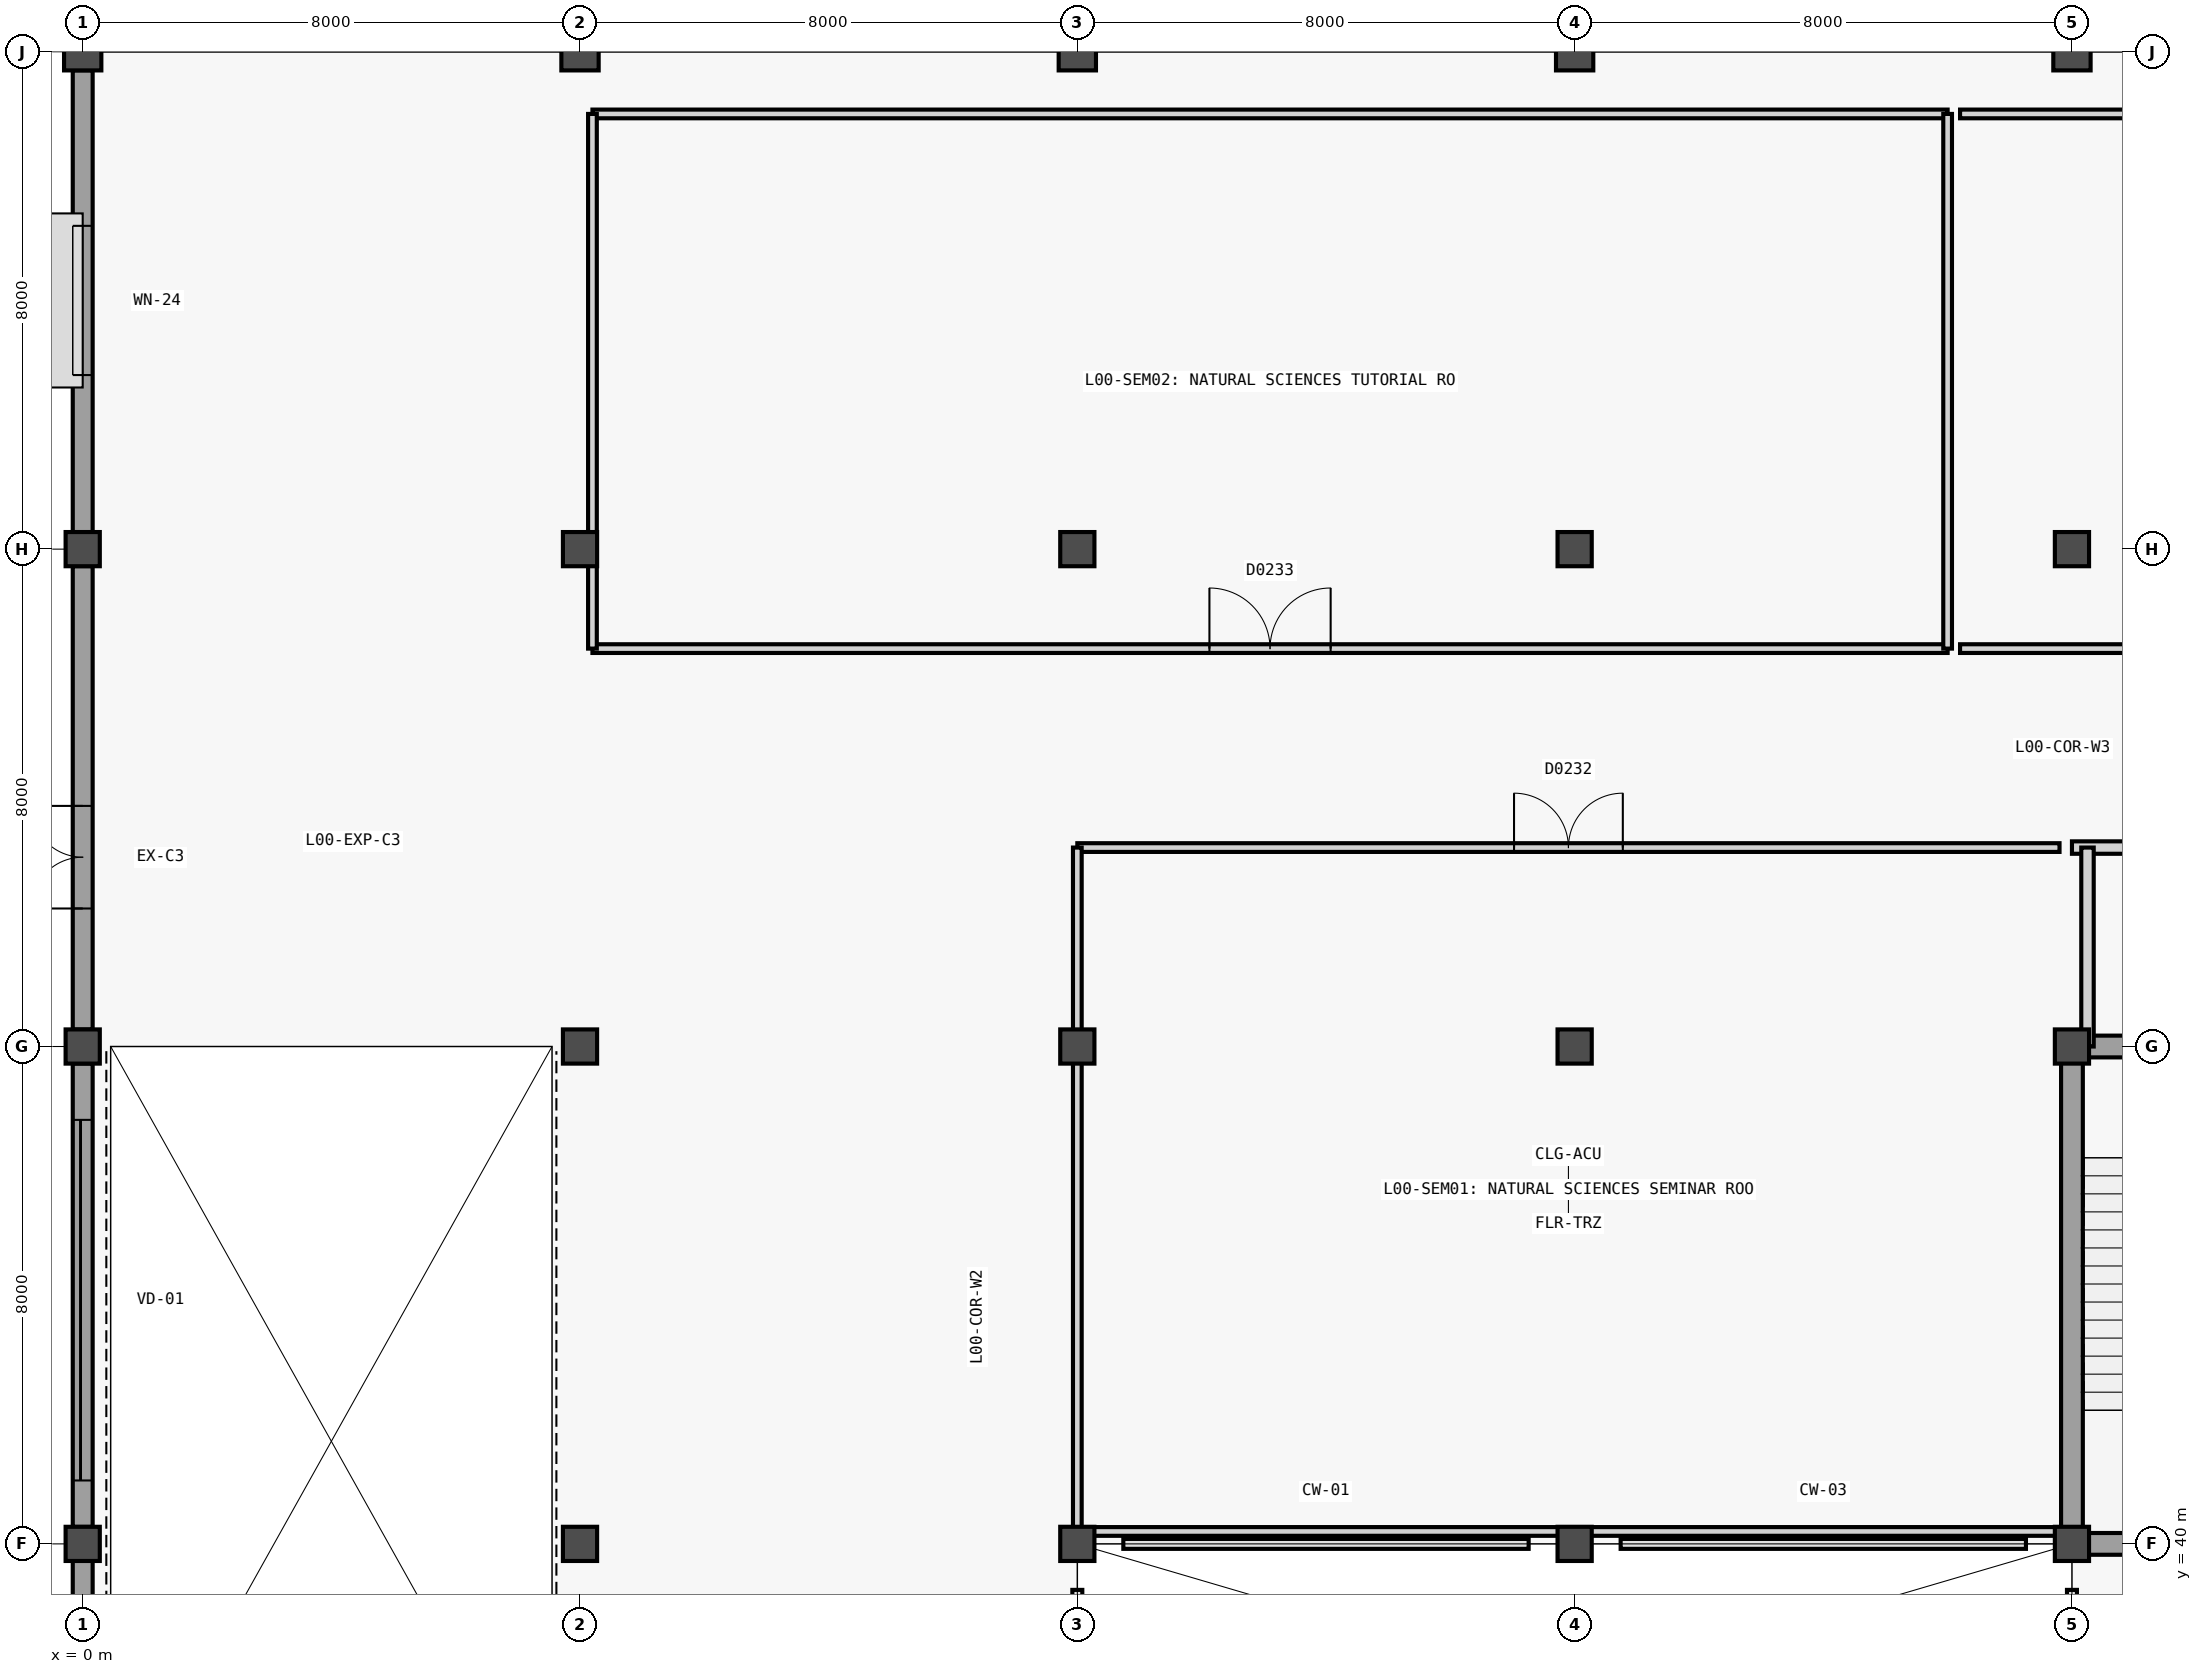
"""IFC4 building model, lengths in metres.
Left out: names, types, materials, properties, quantities, classifications, styles, units other than length and angle.
Written with IfcOpenShell. Run it as: python <this file> out.ifc"""

import sys

from ifc_helpers import new_model, si_unit, direction, frame, frame_2d, origin, origin_2d, place, context, subcontext, project, spatial, rectangle, extrude, element, fill, save


model = new_model("IFC4")
c1 = context("Model", 3, precision=1e-05, world=origin(), true_north=direction((0.0, 1.0)))
c2 = subcontext(c1, "Body", "Model", "MODEL_VIEW")
j1 = project(units=[si_unit("LENGTHUNIT", "METRE"), si_unit("PLANEANGLEUNIT", "RADIAN")], contexts=[c1])
p1 = place(None, origin())
s1 = spatial("IfcSite", under=j1, at=p1, CompositionType="ELEMENT")
p2 = place(p1, origin())
s2 = spatial("IfcBuilding", under=s1, at=p2, CompositionType="ELEMENT")
p3 = place(p2, origin())
s3 = spatial("IfcBuildingStorey", under=s2, at=p3, CompositionType="ELEMENT", Elevation=0.0)
for number, where, z_axis, x_axis in (
    (1, (0.0, 40.0, 0.0), (0.0, 0.0, 1.0), (1.0, 0.0, 0.0)),
    (2, (0.0, 48.0, 0.0), (0.0, 0.0, 1.0), (1.0, 0.0, 0.0)),
    (3, (0.0, 56.0, 0.0), (0.0, 0.0, 1.0), (1.0, 0.0, 0.0)),
):
    element("IfcColumn", number, at=place(p3, frame(where, z_axis=z_axis, x_axis=x_axis)), inside=s3, PredefinedType="COLUMN", context=c2, shape_type="SweptSolid", body=[
        extrude(rectangle(XDim=0.55, YDim=0.55, at=origin_2d()), origin(), (0.0, 0.0, 1.0), 5.4),
    ])
p4 = place(p3, frame((0.0, 64.0, 0.0), z_axis=(0.0, 0.0, 1.0), x_axis=(1.0, 0.0, 0.0)))
e4 = element("IfcColumn", 4, at=p4, inside=s3, PredefinedType="COLUMN", context=c2, shape_type="SweptSolid", body=[
    extrude(rectangle(XDim=0.6, YDim=0.6, at=origin_2d()), origin(), (0.0, 0.0, 1.0), 5.4),
])
for number, where, z_axis, x_axis in (
    (5, (8.0, 40.0, 0.0), (0.0, 0.0, 1.0), (1.0, 0.0, 0.0)),
    (6, (8.0, 48.0, 0.0), (0.0, 0.0, 1.0), (1.0, 0.0, 0.0)),
    (7, (8.0, 56.0, 0.0), (0.0, 0.0, 1.0), (1.0, 0.0, 0.0)),
):
    element("IfcColumn", number, at=place(p3, frame(where, z_axis=z_axis, x_axis=x_axis)), inside=s3, PredefinedType="COLUMN", context=c2, shape_type="SweptSolid", body=[
        extrude(rectangle(XDim=0.55, YDim=0.55, at=origin_2d()), origin(), (0.0, 0.0, 1.0), 5.4),
    ])
p5 = place(p3, frame((8.0, 64.0, 0.0), z_axis=(0.0, 0.0, 1.0), x_axis=(1.0, 0.0, 0.0)))
e8 = element("IfcColumn", 8, at=p5, inside=s3, PredefinedType="COLUMN", context=c2, shape_type="SweptSolid", body=[
    extrude(rectangle(XDim=0.6, YDim=0.6, at=origin_2d()), origin(), (0.0, 0.0, 1.0), 5.4),
])
for number, where, z_axis, x_axis in (
    (9, (16.0, 40.0, 0.0), (0.0, 0.0, 1.0), (1.0, 0.0, 0.0)),
    (10, (16.0, 48.0, 0.0), (0.0, 0.0, 1.0), (1.0, 0.0, 0.0)),
    (11, (16.0, 56.0, 0.0), (0.0, 0.0, 1.0), (1.0, 0.0, 0.0)),
):
    element("IfcColumn", number, at=place(p3, frame(where, z_axis=z_axis, x_axis=x_axis)), inside=s3, PredefinedType="COLUMN", context=c2, shape_type="SweptSolid", body=[
        extrude(rectangle(XDim=0.55, YDim=0.55, at=origin_2d()), origin(), (0.0, 0.0, 1.0), 5.4),
    ])
p6 = place(p3, frame((16.0, 64.0, 0.0), z_axis=(0.0, 0.0, 1.0), x_axis=(1.0, 0.0, 0.0)))
e12 = element("IfcColumn", 12, at=p6, inside=s3, PredefinedType="COLUMN", context=c2, shape_type="SweptSolid", body=[
    extrude(rectangle(XDim=0.6, YDim=0.6, at=origin_2d()), origin(), (0.0, 0.0, 1.0), 5.4),
])
for number, where, z_axis, x_axis in (
    (13, (24.0, 40.0, 0.0), (0.0, 0.0, 1.0), (1.0, 0.0, 0.0)),
    (14, (24.0, 48.0, 0.0), (0.0, 0.0, 1.0), (1.0, 0.0, 0.0)),
    (15, (24.0, 56.0, 0.0), (0.0, 0.0, 1.0), (1.0, 0.0, 0.0)),
):
    element("IfcColumn", number, at=place(p3, frame(where, z_axis=z_axis, x_axis=x_axis)), inside=s3, PredefinedType="COLUMN", context=c2, shape_type="SweptSolid", body=[
        extrude(rectangle(XDim=0.55, YDim=0.55, at=origin_2d()), origin(), (0.0, 0.0, 1.0), 5.4),
    ])
p7 = place(p3, frame((24.0, 64.0, 0.0), z_axis=(0.0, 0.0, 1.0), x_axis=(1.0, 0.0, 0.0)))
e16 = element("IfcColumn", 16, at=p7, inside=s3, PredefinedType="COLUMN", context=c2, shape_type="SweptSolid", body=[
    extrude(rectangle(XDim=0.6, YDim=0.6, at=origin_2d()), origin(), (0.0, 0.0, 1.0), 5.4),
])
for number, where, z_axis, x_axis in (
    (17, (32.0, 40.0, 0.0), (0.0, 0.0, 1.0), (1.0, 0.0, 0.0)),
    (18, (32.0, 48.0, 0.0), (0.0, 0.0, 1.0), (1.0, 0.0, 0.0)),
    (19, (32.0, 56.0, 0.0), (0.0, 0.0, 1.0), (1.0, 0.0, 0.0)),
):
    element("IfcColumn", number, at=place(p3, frame(where, z_axis=z_axis, x_axis=x_axis)), inside=s3, PredefinedType="COLUMN", context=c2, shape_type="SweptSolid", body=[
        extrude(rectangle(XDim=0.55, YDim=0.55, at=origin_2d()), origin(), (0.0, 0.0, 1.0), 5.4),
    ])
p8 = place(p3, frame((32.0, 64.0, 0.0), z_axis=(0.0, 0.0, 1.0), x_axis=(1.0, 0.0, 0.0)))
e20 = element("IfcColumn", 20, at=p8, inside=s3, PredefinedType="COLUMN", context=c2, shape_type="SweptSolid", body=[
    extrude(rectangle(XDim=0.6, YDim=0.6, at=origin_2d()), origin(), (0.0, 0.0, 1.0), 5.4),
])
p9 = place(p3, frame((0.0, 32.298, 0.0), z_axis=(0.0, 0.0, 1.0), x_axis=(0.0, 1.0, 0.0)))
e21 = element("IfcWall", 21, at=p9, inside=s3, PredefinedType="SOLIDWALL", context=c2, shape_type="SweptSolid", body=[
    extrude(rectangle(XDim=7.429, YDim=0.32, at=frame_2d((3.714, 0.0))), origin(), (0.0, 0.0, 1.0), 5.14),
])
p10 = place(p9, frame((2.727, 0.0, 0.88)))
e22 = element("IfcOpeningElement", 22, at=p10, cuts=e21, PredefinedType="OPENING", context=c2, shape_type="SweptSolid", body=[
    extrude(rectangle(XDim=1.95, YDim=1.55, at=frame_2d((0.975, 0.775))), frame((0.0, 0.17, 0.0), z_axis=(0.0, -1.0, 0.0), x_axis=(1.0, 0.0, 0.0)), (0.0, 0.0, 1.0), 0.34),
])
p11 = place(p3, frame((0.0, 40.273, 0.0), z_axis=(0.0, 0.0, 1.0), x_axis=(0.0, 1.0, 0.0)))
e23 = element("IfcWall", 23, at=p11, inside=s3, PredefinedType="SOLIDWALL", context=c2, shape_type="SweptSolid", body=[
    extrude(rectangle(XDim=7.454, YDim=0.32, at=frame_2d((3.727, 0.0))), origin(), (0.0, 0.0, 1.0), 5.14),
])
p12 = place(p11, frame((0.747, 0.0, 0.0)))
e24 = element("IfcOpeningElement", 24, at=p12, cuts=e23, PredefinedType="OPENING", context=c2, shape_type="SweptSolid", body=[
    extrude(rectangle(XDim=5.8, YDim=2.8, at=frame_2d((2.9, 1.4))), frame((0.0, 0.17, 0.0), z_axis=(0.0, -1.0, 0.0), x_axis=(1.0, 0.0, 0.0)), (0.0, 0.0, 1.0), 0.34),
])
p13 = place(p3, frame((0.0, 48.273, 0.0), z_axis=(0.0, 0.0, 1.0), x_axis=(0.0, 1.0, 0.0)))
e25 = element("IfcWall", 25, at=p13, inside=s3, PredefinedType="SOLIDWALL", context=c2, shape_type="SweptSolid", body=[
    extrude(rectangle(XDim=7.454, YDim=0.32, at=frame_2d((3.727, 0.0))), origin(), (0.0, 0.0, 1.0), 5.14),
])
p14 = place(p13, frame((1.947, 0.0, 0.0)))
e26 = element("IfcOpeningElement", 26, at=p14, cuts=e25, PredefinedType="OPENING", context=c2, shape_type="SweptSolid", body=[
    extrude(rectangle(XDim=1.65, YDim=2.2, at=frame_2d((0.825, 1.1))), frame((0.0, 0.17, 0.0), z_axis=(0.0, -1.0, 0.0), x_axis=(1.0, 0.0, 0.0)), (0.0, 0.0, 1.0), 0.34),
])
p15 = place(p3, frame((0.0, 56.273, 0.0), z_axis=(0.0, 0.0, 1.0), x_axis=(0.0, 1.0, 0.0)))
e27 = element("IfcWall", 27, at=p15, inside=s3, PredefinedType="SOLIDWALL", context=c2, shape_type="SweptSolid", body=[
    extrude(rectangle(XDim=7.429, YDim=0.32, at=frame_2d((3.714, 0.0))), origin(), (0.0, 0.0, 1.0), 5.14),
])
p16 = place(p15, frame((2.527, 0.0, 0.88)))
e28 = element("IfcOpeningElement", 28, at=p16, cuts=e27, PredefinedType="OPENING", context=c2, shape_type="SweptSolid", body=[
    extrude(rectangle(XDim=2.4, YDim=1.65, at=frame_2d((1.2, 0.825))), frame((0.0, 0.17, 0.0), z_axis=(0.0, -1.0, 0.0), x_axis=(1.0, 0.0, 0.0)), (0.0, 0.0, 1.0), 0.34),
])
for number, where, z_axis, x_axis in (
    (29, (32.0, 40.0, 0.0), (0.0, 0.0, 1.0), (1.0, 0.0, 0.0)),
    (30, (32.0, 40.0, 0.0), (0.0, 0.0, 1.0), (0.0, 1.0, 0.0)),
):
    element("IfcWall", number, at=place(p3, frame(where, z_axis=z_axis, x_axis=x_axis)), inside=s3, PredefinedType="SHEAR", context=c2, shape_type="SweptSolid", body=[
        extrude(rectangle(XDim=8.0, YDim=0.35, at=frame_2d((4.0, 0.0))), origin(), (0.0, 0.0, 1.0), 5.4),
    ])
p17 = place(p3, frame((32.0, 48.0, 0.0), z_axis=(0.0, 0.0, 1.0), x_axis=(1.0, 0.0, 0.0)))
e31 = element("IfcWall", 31, at=p17, inside=s3, PredefinedType="SHEAR", context=c2, shape_type="SweptSolid", body=[
    extrude(rectangle(XDim=8.0, YDim=0.35, at=frame_2d((4.0, 0.0))), origin(), (0.0, 0.0, 1.0), 5.4),
])
p18 = place(p17, frame((1.98, 0.0, 0.0)))
e32 = element("IfcOpeningElement", 32, at=p18, cuts=e31, PredefinedType="OPENING", context=c2, shape_type="SweptSolid", body=[
    extrude(rectangle(XDim=1.15, YDim=2.2, at=frame_2d((0.575, 1.1))), frame((0.0, 0.185, 0.0), z_axis=(0.0, -1.0, 0.0), x_axis=(1.0, 0.0, 0.0)), (0.0, 0.0, 1.0), 0.37),
])
p19 = place(p17, frame((4.25, 0.0, 0.0)))
e33 = element("IfcOpeningElement", 33, at=p19, cuts=e31, PredefinedType="OPENING", context=c2, shape_type="SweptSolid", body=[
    extrude(rectangle(XDim=1.0, YDim=2.15, at=frame_2d((0.5, 1.075))), frame((0.0, 0.185, 0.0), z_axis=(0.0, -1.0, 0.0), x_axis=(1.0, 0.0, 0.0)), (0.0, 0.0, 1.0), 0.37),
])
p20 = place(p17, frame((6.2, 0.0, 0.0)))
e34 = element("IfcOpeningElement", 34, at=p20, cuts=e31, PredefinedType="OPENING", context=c2, shape_type="SweptSolid", body=[
    extrude(rectangle(XDim=1.0, YDim=2.15, at=frame_2d((0.5, 1.075))), frame((0.0, 0.185, 0.0), z_axis=(0.0, -1.0, 0.0), x_axis=(1.0, 0.0, 0.0)), (0.0, 0.0, 1.0), 0.37),
])
p21 = place(p3, frame((32.0, 51.2, 0.0), z_axis=(0.0, 0.0, 1.0), x_axis=(1.0, 0.0, 0.0)))
e35 = element("IfcWall", 35, at=p21, inside=s3, PredefinedType="PARTITIONING", context=c2, shape_type="SweptSolid", body=[
    extrude(rectangle(XDim=7.75, YDim=0.2, at=frame_2d((3.875, 0.0))), origin(), (0.0, 0.0, 1.0), 5.12),
])
p22 = place(p21, frame((3.375, 0.0, 0.0)))
e36 = element("IfcOpeningElement", 36, at=p22, cuts=e35, PredefinedType="OPENING", context=c2, shape_type="SweptSolid", body=[
    extrude(rectangle(XDim=1.05, YDim=2.15, at=frame_2d((0.525, 1.075))), frame((0.0, 0.11, 0.0), z_axis=(0.0, -1.0, 0.0), x_axis=(1.0, 0.0, 0.0)), (0.0, 0.0, 1.0), 0.22),
])
p23 = place(p3, frame((32.25, 48.0, 0.0), z_axis=(0.0, 0.0, 1.0), x_axis=(0.0, 1.0, 0.0)))
e37 = element("IfcWall", 37, at=p23, inside=s3, PredefinedType="PARTITIONING", context=c2, shape_type="SweptSolid", body=[
    extrude(rectangle(XDim=3.2, YDim=0.2, at=frame_2d((1.6, 0.0))), origin(), (0.0, 0.0, 1.0), 4.47),
])
p24 = place(p3, frame((16.0, 40.2, 0.0), z_axis=(0.0, 0.0, 1.0), x_axis=(1.0, 0.0, 0.0)))
e38 = element("IfcWall", 38, at=p24, inside=s3, PredefinedType="PARTITIONING", context=c2, shape_type="SweptSolid", body=[
    extrude(rectangle(XDim=15.8, YDim=0.14, at=frame_2d((7.9, 0.0))), origin(), (0.0, 0.0, 1.0), 4.37),
])
p25 = place(p3, frame((16.0, 51.2, 0.0), z_axis=(0.0, 0.0, 1.0), x_axis=(1.0, 0.0, 0.0)))
e39 = element("IfcWall", 39, at=p25, inside=s3, PredefinedType="PARTITIONING", context=c2, shape_type="SweptSolid", body=[
    extrude(rectangle(XDim=15.8, YDim=0.14, at=frame_2d((7.9, 0.0))), origin(), (0.0, 0.0, 1.0), 5.14),
])
p26 = place(p25, frame((7.025, 0.0, 0.0)))
e40 = element("IfcOpeningElement", 40, at=p26, cuts=e39, PredefinedType="OPENING", context=c2, shape_type="SweptSolid", body=[
    extrude(rectangle(XDim=1.75, YDim=2.2, at=frame_2d((0.875, 1.1))), frame((0.0, 0.08, 0.0), z_axis=(0.0, -1.0, 0.0), x_axis=(1.0, 0.0, 0.0)), (0.0, 0.0, 1.0), 0.16),
])
p27 = place(p3, frame((16.0, 40.2, 0.0), z_axis=(0.0, 0.0, 1.0), x_axis=(0.0, 1.0, 0.0)))
e41 = element("IfcWall", 41, at=p27, inside=s3, PredefinedType="PARTITIONING", context=c2, shape_type="SweptSolid", body=[
    extrude(rectangle(XDim=11.0, YDim=0.14, at=frame_2d((5.5, 0.0))), origin(), (0.0, 0.0, 1.0), 4.47),
])
p28 = place(p3, frame((8.2, 54.4, 0.0), z_axis=(0.0, 0.0, 1.0), x_axis=(1.0, 0.0, 0.0)))
e42 = element("IfcWall", 42, at=p28, inside=s3, PredefinedType="PARTITIONING", context=c2, shape_type="SweptSolid", body=[
    extrude(rectangle(XDim=21.8, YDim=0.14, at=frame_2d((10.9, 0.0))), origin(), (0.0, 0.0, 1.0), 5.14),
])
p29 = place(p28, frame((9.925, 0.0, 0.0)))
e43 = element("IfcOpeningElement", 43, at=p29, cuts=e42, PredefinedType="OPENING", context=c2, shape_type="SweptSolid", body=[
    extrude(rectangle(XDim=1.95, YDim=2.35, at=frame_2d((0.975, 1.175))), frame((0.0, 0.08, 0.0), z_axis=(0.0, -1.0, 0.0), x_axis=(1.0, 0.0, 0.0)), (0.0, 0.0, 1.0), 0.16),
])
p30 = place(p3, frame((8.2, 63.0, 0.0), z_axis=(0.0, 0.0, 1.0), x_axis=(1.0, 0.0, 0.0)))
e44 = element("IfcWall", 44, at=p30, inside=s3, PredefinedType="PARTITIONING", context=c2, shape_type="SweptSolid", body=[
    extrude(rectangle(XDim=21.8, YDim=0.14, at=frame_2d((10.9, 0.0))), origin(), (0.0, 0.0, 1.0), 5.14),
])
p31 = place(p3, frame((8.2, 54.4, 0.0), z_axis=(0.0, 0.0, 1.0), x_axis=(0.0, 1.0, 0.0)))
e45 = element("IfcWall", 45, at=p31, inside=s3, PredefinedType="PARTITIONING", context=c2, shape_type="SweptSolid", body=[
    extrude(rectangle(XDim=8.6, YDim=0.14, at=frame_2d((4.3, 0.0))), origin(), (0.0, 0.0, 1.0), 4.47),
])
p32 = place(p3, frame((30.0, 54.4, 0.0), z_axis=(0.0, 0.0, 1.0), x_axis=(0.0, 1.0, 0.0)))
e46 = element("IfcWall", 46, at=p32, inside=s3, PredefinedType="PARTITIONING", context=c2, shape_type="SweptSolid", body=[
    extrude(rectangle(XDim=8.6, YDim=0.14, at=frame_2d((4.3, 0.0))), origin(), (0.0, 0.0, 1.0), 5.14),
])
p33 = place(p3, frame((30.2, 54.4, 0.0), z_axis=(0.0, 0.0, 1.0), x_axis=(1.0, 0.0, 0.0)))
e47 = element("IfcWall", 47, at=p33, inside=s3, PredefinedType="PARTITIONING", context=c2, shape_type="SweptSolid", body=[
    extrude(rectangle(XDim=24.8, YDim=0.14, at=frame_2d((12.4, 0.0))), origin(), (0.0, 0.0, 1.0), 5.14),
])
p34 = place(p33, frame((11.575, 0.0, 0.0)))
e48 = element("IfcOpeningElement", 48, at=p34, cuts=e47, PredefinedType="OPENING", context=c2, shape_type="SweptSolid", body=[
    extrude(rectangle(XDim=1.65, YDim=2.3, at=frame_2d((0.825, 1.15))), frame((0.0, 0.08, 0.0), z_axis=(0.0, -1.0, 0.0), x_axis=(1.0, 0.0, 0.0)), (0.0, 0.0, 1.0), 0.16),
])
p35 = place(p3, frame((30.2, 63.0, 0.0), z_axis=(0.0, 0.0, 1.0), x_axis=(1.0, 0.0, 0.0)))
e49 = element("IfcWall", 49, at=p35, inside=s3, PredefinedType="PARTITIONING", context=c2, shape_type="SweptSolid", body=[
    extrude(rectangle(XDim=24.8, YDim=0.14, at=frame_2d((12.4, 0.0))), origin(), (0.0, 0.0, 1.0), 5.14),
])
p36 = place(p12, origin())
e50 = element("IfcDoor", 50, at=p36, inside=s3, OperationType="ROLLINGUP", PredefinedType="GATE", context=c2, shape_type="SweptSolid", body=[
    extrude(rectangle(XDim=5.8, YDim=2.8, at=frame_2d((2.9, 1.4))), frame((0.0, 0.025, 0.0), z_axis=(0.0, -1.0, 0.0), x_axis=(1.0, 0.0, 0.0)), (0.0, 0.0, 1.0), 0.05),
])
fill(e24, e50)
p37 = place(p14, origin())
e51 = element("IfcDoor", 51, at=p37, inside=s3, OperationType="DOUBLE_DOOR_SINGLE_SWING", PredefinedType="DOOR", context=c2, shape_type="SweptSolid", body=[
    extrude(rectangle(XDim=1.65, YDim=2.2, at=frame_2d((0.825, 1.1))), frame((0.0, 0.025, 0.0), z_axis=(0.0, -1.0, 0.0), x_axis=(1.0, 0.0, 0.0)), (0.0, 0.0, 1.0), 0.05),
])
fill(e26, e51)
p38 = place(p16, origin())
e52 = element("IfcWindow", 52, at=p38, inside=s3, PartitioningType="SINGLE_PANEL", PredefinedType="WINDOW", context=c2, shape_type="SweptSolid", body=[
    extrude(rectangle(XDim=2.4, YDim=1.65, at=frame_2d((1.2, 0.825))), frame((0.0, 0.03, 0.0), z_axis=(0.0, -1.0, 0.0), x_axis=(1.0, 0.0, 0.0)), (0.0, 0.0, 1.0), 0.06),
])
fill(e28, e52)
p39 = place(p26, origin())
e53 = element("IfcDoor", 53, at=p39, inside=s3, OperationType="DOUBLE_DOOR_SINGLE_SWING", PredefinedType="DOOR", context=c2, shape_type="SweptSolid", body=[
    extrude(rectangle(XDim=1.75, YDim=2.2, at=frame_2d((0.875, 1.1))), frame((0.0, 0.025, 0.0), z_axis=(0.0, -1.0, 0.0), x_axis=(1.0, 0.0, 0.0)), (0.0, 0.0, 1.0), 0.05),
])
fill(e40, e53)
p40 = place(p29, origin())
e54 = element("IfcDoor", 54, at=p40, inside=s3, OperationType="DOUBLE_DOOR_SINGLE_SWING", PredefinedType="DOOR", context=c2, shape_type="SweptSolid", body=[
    extrude(rectangle(XDim=1.95, YDim=2.35, at=frame_2d((0.975, 1.175))), frame((0.0, 0.025, 0.0), z_axis=(0.0, -1.0, 0.0), x_axis=(1.0, 0.0, 0.0)), (0.0, 0.0, 1.0), 0.05),
])
fill(e43, e54)
save(model, sys.argv[1])
